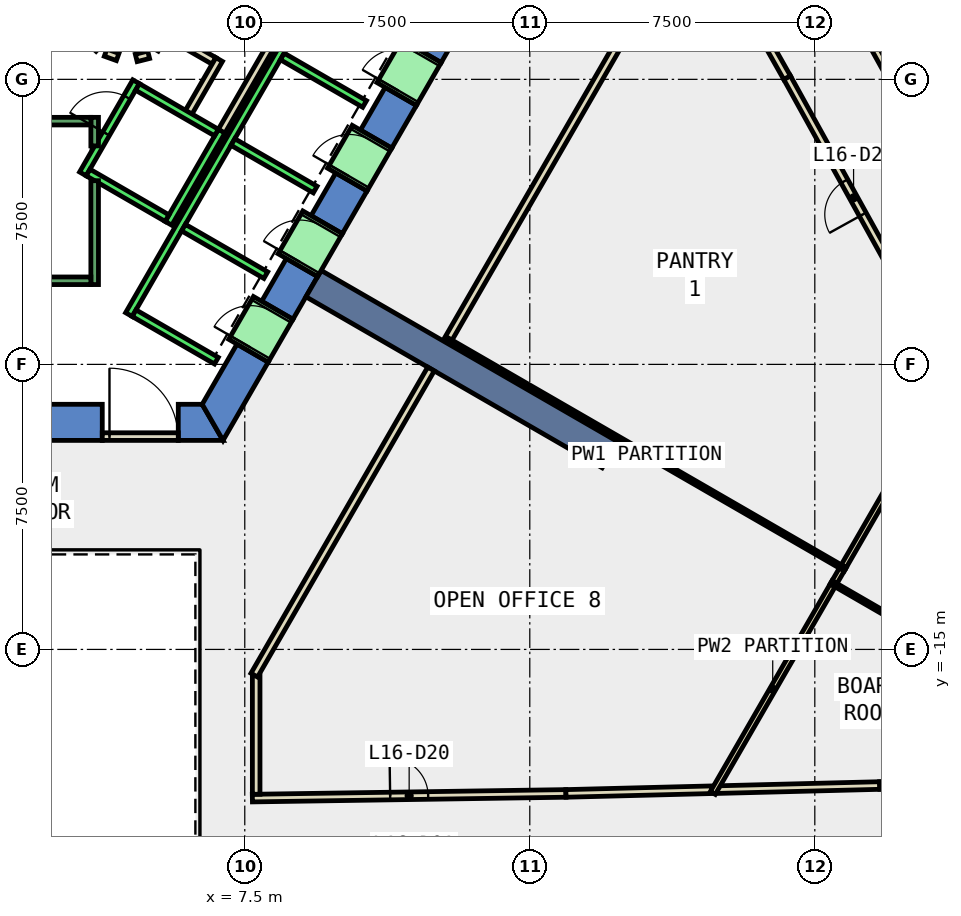
"""IFC4 building model, lengths in metres.
Left out: names, types, materials, properties, quantities, classifications, styles, units other than length and angle.
Written with IfcOpenShell. Run it as: python <this file> out.ifc"""

import sys

from ifc_helpers import new_model, si_unit, direction, frame, frame_2d, origin, place, context, subcontext, project, spatial, polyline, rectangle, outline, extrude, element, fill, save


model = new_model("IFC4")
c1 = context("Model", 3, precision=1e-05, world=origin(), true_north=direction((0.0, 1.0)))
c2 = subcontext(c1, "Body", "Model", "MODEL_VIEW")
j1 = project(units=[si_unit("LENGTHUNIT", "METRE"), si_unit("PLANEANGLEUNIT", "RADIAN")], contexts=[c1])
p1 = place(None, origin())
s1 = spatial("IfcSite", under=j1, at=p1, CompositionType="ELEMENT")
p2 = place(p1, origin())
s2 = spatial("IfcBuilding", under=s1, at=p2, CompositionType="ELEMENT")
p3 = place(p2, frame((0.0, 0.0, 77.0)))
s3 = spatial("IfcBuildingStorey", under=s2, at=p3, CompositionType="ELEMENT", Elevation=77.0)
p4 = place(p3, frame((0.0, 0.0, -0.4)))
e1 = element("IfcWall", 1, at=p4, inside=s3, PredefinedType="SHEAR", context=c2, shape_type="SweptSolid", body=[
    extrude(outline(polyline([(3.75, -9.5), (3.75, -8.55), (-6.38, -8.55), (-6.928, -9.5), (3.75, -9.5)])), origin(), (0.0, 0.0, 1.0), 4.0),
])
p5 = place(p3, frame((0.0, 0.0, -0.4)))
e2 = element("IfcWall", 2, at=p5, inside=s3, PredefinedType="SHEAR", context=c2, shape_type="SweptSolid", body=[
    extrude(outline(polyline([(5.75, -8.55), (5.75, -9.5), (6.928, -9.5), (6.38, -8.55), (5.75, -8.55)])), origin(), (0.0, 0.0, 1.0), 4.0),
])
p6 = place(p3, frame((0.0, 0.0, -0.4)))
e3 = element("IfcWall", 3, at=p6, inside=s3, PredefinedType="SHEAR", context=c2, shape_type="SweptSolid", body=[
    extrude(outline(polyline([(8.117, -7.44), (7.295, -6.965), (6.38, -8.55), (6.928, -9.5), (8.117, -7.44)])), origin(), (0.0, 0.0, 1.0), 4.0),
])
p7 = place(p3, frame((0.0, 0.0, -0.4)))
e4 = element("IfcWall", 4, at=p7, inside=s3, PredefinedType="SHEAR", context=c2, shape_type="SweptSolid", body=[
    extrude(outline(polyline([(9.417, -5.189), (8.594, -4.714), (7.945, -5.839), (8.767, -6.314), (9.417, -5.189)])), origin(), (0.0, 0.0, 1.0), 4.0),
])
p8 = place(p3, frame((0.0, 0.0, -0.4)))
e5 = element("IfcWall", 5, at=p8, inside=s3, PredefinedType="SHEAR", context=c2, shape_type="SweptSolid", body=[
    extrude(outline(polyline([(10.717, -2.937), (9.894, -2.462), (9.244, -3.588), (10.067, -4.063), (10.717, -2.937)])), origin(), (0.0, 0.0, 1.0), 4.0),
])
p9 = place(p3, frame((0.0, 0.0, -0.4)))
e6 = element("IfcWall", 6, at=p9, inside=s3, PredefinedType="SHEAR", context=c2, shape_type="SweptSolid", body=[
    extrude(outline(polyline([(12.017, -0.686), (11.194, -0.211), (10.544, -1.336), (11.367, -1.811), (12.017, -0.686)])), origin(), (0.0, 0.0, 1.0), 4.0),
])
p10 = place(p3, frame((0.0, 0.0, -0.4)))
e7 = element("IfcWall", 7, at=p10, inside=s3, PredefinedType="SHEAR", context=c2, shape_type="SweptSolid", body=[
    extrude(outline(polyline([(11.844, 0.915), (12.667, 0.44), (13.856, 2.5), (12.759, 2.5), (11.844, 0.915)])), origin(), (0.0, 0.0, 1.0), 4.0),
])
p11 = place(p3, frame((9.31, -5.375, -0.4), z_axis=(0.0, 0.0, 1.0), x_axis=(0.866017533419, -0.500013631625, 0.0)))
e8 = element("IfcWall", 8, at=p11, inside=s3, PredefinedType="SHEAR", context=c2, shape_type="SweptSolid", body=[
    extrude(rectangle(XDim=9.0, YDim=0.8, at=frame_2d((4.5, 0.0))), origin(), (0.0, 0.0, 1.0), 4.0),
])
p12 = place(p3, frame((7.7, -18.912, 0.0), z_axis=(0.0, 0.0, 1.0), x_axis=(0.999888819649, 0.014911349423, 0.0)))
e9 = element("IfcWall", 9, at=p12, inside=s3, PredefinedType="PARTITIONING", context=c2, shape_type="SweptSolid", body=[
    extrude(rectangle(XDim=8.252, YDim=0.2, at=frame_2d((4.126, 0.0))), origin(), (0.0, 0.0, 1.0), 3.6),
])
p13 = place(p12, frame((3.626, 0.0, 0.0)))
e10 = element("IfcOpeningElement", 10, at=p13, cuts=e9, PredefinedType="OPENING", context=c2, shape_type="SweptSolid", body=[
    extrude(rectangle(XDim=1.0, YDim=2.1, at=frame_2d((0.5, 1.05))), frame((0.0, 0.11, 0.0), z_axis=(0.0, -1.0, 0.0), x_axis=(1.0, 0.0, 0.0)), (0.0, 0.0, 1.0), 0.22),
])
p14 = place(p3, frame((15.951, -18.789, 0.0), z_axis=(0.0, 0.0, 1.0), x_axis=(0.999680018084, 0.025295482688, 0.0)))
e11 = element("IfcWall", 11, at=p14, inside=s3, PredefinedType="PARTITIONING", context=c2, shape_type="SweptSolid", body=[
    extrude(rectangle(XDim=3.841, YDim=0.2, at=frame_2d((1.921, 0.0))), origin(), (0.0, 0.0, 1.0), 3.6),
])
p15 = place(p3, frame((25.27, -6.281, 0.0), z_axis=(0.0, 0.0, 1.0), x_axis=(-0.484062485326, 0.875033433818, 0.0)))
e12 = element("IfcWall", 12, at=p15, inside=s3, PredefinedType="PARTITIONING", context=c2, shape_type="SweptSolid", body=[
    extrude(rectangle(XDim=7.23, YDim=0.2, at=frame_2d((3.615, 0.0))), origin(), (0.0, 0.0, 1.0), 3.6),
])
p16 = place(p15, frame((3.115, 0.0, 0.0)))
e13 = element("IfcOpeningElement", 13, at=p16, cuts=e12, PredefinedType="OPENING", context=c2, shape_type="SweptSolid", body=[
    extrude(rectangle(XDim=1.0, YDim=2.1, at=frame_2d((0.5, 1.05))), frame((0.0, 0.11, 0.0), z_axis=(0.0, -1.0, 0.0), x_axis=(1.0, 0.0, 0.0)), (0.0, 0.0, 1.0), 0.22),
])
p17 = place(p3, frame((21.77, 0.046, 0.0), z_axis=(0.0, 0.0, 1.0), x_axis=(-0.492148137455, 0.870511465059, 0.0)))
e14 = element("IfcWall", 14, at=p17, inside=s3, PredefinedType="PARTITIONING", context=c2, shape_type="SweptSolid", body=[
    extrude(rectangle(XDim=4.868, YDim=0.2, at=frame_2d((2.434, 0.0))), origin(), (0.0, 0.0, 1.0), 3.6),
])
p18 = place(p3, frame((19.941, -18.689, 0.0), z_axis=(0.0, 0.0, 1.0), x_axis=(0.999680388185, 0.025280852018, 0.0)))
e15 = element("IfcWall", 15, at=p18, inside=s3, PredefinedType="PARTITIONING", context=c2, shape_type="SweptSolid", body=[
    extrude(rectangle(XDim=4.269, YDim=0.2, at=frame_2d((2.134, 0.0))), origin(), (0.0, 0.0, 1.0), 3.6),
])
p19 = place(p3, frame((24.208, -18.581, 0.0), z_axis=(0.0, 0.0, 1.0), x_axis=(0.99936260762, 0.035698438215, 0.0)))
e16 = element("IfcWall", 16, at=p19, inside=s3, PredefinedType="PARTITIONING", context=c2, shape_type="SweptSolid", body=[
    extrude(rectangle(XDim=7.564, YDim=0.2, at=frame_2d((3.782, 0.0))), origin(), (0.0, 0.0, 1.0), 3.6),
])
p20 = place(p19, frame((3.282, 0.0, 0.0)))
e17 = element("IfcOpeningElement", 17, at=p20, cuts=e16, PredefinedType="OPENING", context=c2, shape_type="SweptSolid", body=[
    extrude(rectangle(XDim=1.0, YDim=2.1, at=frame_2d((0.5, 1.05))), frame((0.0, 0.11, 0.0), z_axis=(0.0, -1.0, 0.0), x_axis=(1.0, 0.0, 0.0)), (0.0, 0.0, 1.0), 0.22),
])
p21 = place(p3, frame((23.828, 1.283, 0.0), z_axis=(0.0, 0.0, 1.0), x_axis=(0.484064127728, -0.875032525251, 0.0)))
e18 = element("IfcWall", 18, at=p21, inside=s3, PredefinedType="PARTITIONING", context=c2, shape_type="SweptSolid", body=[
    extrude(rectangle(XDim=7.251, YDim=0.2, at=frame_2d((3.625, 0.0))), origin(), (0.0, 0.0, 1.0), 3.6),
])
p22 = place(p21, frame((3.201, 0.0, 0.0)))
e19 = element("IfcOpeningElement", 19, at=p22, cuts=e18, PredefinedType="OPENING", context=c2, shape_type="SweptSolid", body=[
    extrude(rectangle(XDim=1.0, YDim=2.1, at=frame_2d((0.5, 1.05))), frame((0.0, 0.11, 0.0), z_axis=(0.0, -1.0, 0.0), x_axis=(1.0, 0.0, 0.0)), (0.0, 0.0, 1.0), 0.22),
])
p23 = place(p3, frame((5.499, 1.172, 0.0), z_axis=(0.0, 0.0, 1.0), x_axis=(0.866333505267, -0.499465972466, 0.0)))
e20 = element("IfcWall", 20, at=p23, inside=s3, PredefinedType="PARTITIONING", context=c2, shape_type="SweptSolid", body=[
    extrude(rectangle(XDim=1.374, YDim=0.2, at=frame_2d((0.687, 0.0))), origin(), (0.0, 0.0, 1.0), 3.6),
])
p24 = place(p3, frame((6.826, 0.522, 0.0), z_axis=(0.0, 0.0, 1.0), x_axis=(-0.500016722714, -0.866015748706, 0.0)))
e21 = element("IfcWall", 21, at=p24, inside=s3, PredefinedType="PARTITIONING", context=c2, shape_type="SweptSolid", body=[
    extrude(rectangle(XDim=1.7, YDim=0.2, at=frame_2d((0.85, 0.0))), origin(), (0.0, 0.0, 1.0), 3.6),
])
p25 = place(p3, frame((8.192, 0.888, 0.0), z_axis=(0.0, 0.0, 1.0), x_axis=(-0.499940625693, -0.866059680843, 0.0)))
e22 = element("IfcWall", 22, at=p25, inside=s3, PredefinedType="PARTITIONING", context=c2, shape_type="SweptSolid", body=[
    extrude(rectangle(XDim=2.68, YDim=0.2, at=frame_2d((1.34, 0.0))), origin(), (0.0, 0.0, 1.0), 3.6),
])
p26 = place(p3, frame((3.838, 0.702, 0.0), z_axis=(0.0, 0.0, 1.0), x_axis=(0.941035081519, -0.338308993895, 0.0)))
e23 = element("IfcWall", 23, at=p26, inside=s3, PredefinedType="PARTITIONING", context=c2, shape_type="SweptSolid", body=[
    extrude(rectangle(XDim=0.337, YDim=0.2, at=frame_2d((0.168, 0.0))), origin(), (0.0, 0.0, 1.0), 3.6),
])
p27 = place(p3, frame((4.644, 0.564, 0.0), z_axis=(0.0, 0.0, 1.0), x_axis=(0.969929076366, 0.243387729394, 0.0)))
e24 = element("IfcWall", 24, at=p27, inside=s3, PredefinedType="PARTITIONING", context=c2, shape_type="SweptSolid", body=[
    extrude(rectangle(XDim=0.337, YDim=0.2, at=frame_2d((0.168, 0.0))), origin(), (0.0, 0.0, 1.0), 3.6),
])
p28 = place(p3, frame((7.8, -15.69, 0.0), z_axis=(0.0, 0.0, 1.0), x_axis=(0.0, -1.0, 0.0)))
e25 = element("IfcWall", 25, at=p28, inside=s3, PredefinedType="PARTITIONING", context=c2, shape_type="SweptSolid", body=[
    extrude(rectangle(XDim=3.121, YDim=0.2, at=frame_2d((1.561, 0.0))), origin(), (0.0, 0.0, 1.0), 3.6),
])
p29 = place(p3, frame((12.4, -7.621, 0.0), z_axis=(0.0, 0.0, 1.0), x_axis=(-0.49990497871, -0.866080257402, 0.0)))
e26 = element("IfcWall", 26, at=p29, inside=s3, PredefinedType="PARTITIONING", context=c2, shape_type="SweptSolid", body=[
    extrude(rectangle(XDim=9.302, YDim=0.2, at=frame_2d((4.651, 0.0))), origin(), (0.0, 0.0, 1.0), 3.6),
])
p30 = place(p3, frame((19.374, 4.458, 0.0), z_axis=(0.0, 0.0, 1.0), x_axis=(-0.499973880856, -0.866040483154, 0.0)))
e27 = element("IfcWall", 27, at=p30, inside=s3, PredefinedType="PARTITIONING", context=c2, shape_type="SweptSolid", body=[
    extrude(rectangle(XDim=13.113, YDim=0.2, at=frame_2d((6.556, 0.0))), origin(), (0.0, 0.0, 1.0), 3.6),
])
p31 = place(p3, frame((12.843, -6.855, 0.0), z_axis=(0.0, 0.0, 1.0), x_axis=(0.866054959007, -0.499948805358, 0.0)))
e28 = element("IfcWall", 28, at=p31, inside=s3, PredefinedType="PARTITIONING", context=c2, shape_type="SweptSolid", body=[
    extrude(rectangle(XDim=12.075, YDim=0.1, at=frame_2d((6.038, 0.0))), origin(), (0.0, 0.0, 1.0), 3.6),
])
p32 = place(p3, frame((22.969, -13.316, 0.0), z_axis=(0.0, 0.0, 1.0), x_axis=(-0.500007312183, -0.866021182053, 0.0)))
e29 = element("IfcWall", 29, at=p32, inside=s3, PredefinedType="PARTITIONING", context=c2, shape_type="SweptSolid", body=[
    extrude(rectangle(XDim=6.306, YDim=0.15, at=frame_2d((3.153, 0.0))), origin(), (0.0, 0.0, 1.0), 3.6),
])
p33 = place(p3, frame((23.211, -12.898, 0.0), z_axis=(0.0, 0.0, 1.0), x_axis=(-0.501488909663, -0.865164073159, 0.0)))
e30 = element("IfcWall", 30, at=p33, inside=s3, PredefinedType="PARTITIONING", context=c2, shape_type="SweptSolid", body=[
    extrude(rectangle(XDim=0.383, YDim=0.15, at=frame_2d((0.191, 0.0))), origin(), (0.0, 0.0, 1.0), 3.6),
])
p34 = place(p3, frame((26.172, -7.768, 0.0), z_axis=(0.0, 0.0, 1.0), x_axis=(-0.499945058274, -0.866057122081, 0.0)))
e31 = element("IfcWall", 31, at=p34, inside=s3, PredefinedType="PARTITIONING", context=c2, shape_type="SweptSolid", body=[
    extrude(rectangle(XDim=5.823, YDim=0.15, at=frame_2d((2.912, 0.0))), origin(), (0.0, 0.0, 1.0), 3.6),
])
p35 = place(p3, frame((22.929, -13.235, 0.0), z_axis=(0.0, 0.0, 1.0), x_axis=(0.866003823807, -0.500037375755, 0.0)))
e32 = element("IfcWall", 32, at=p35, inside=s3, PredefinedType="PARTITIONING", context=c2, shape_type="SweptSolid", body=[
    extrude(rectangle(XDim=10.245, YDim=0.1, at=frame_2d((5.123, 0.0))), origin(), (0.0, 0.0, 1.0), 3.6),
])
p36 = place(p3, frame((3.75, -9.4, 0.0), z_axis=(0.0, 0.0, 1.0), x_axis=(1.0, 0.0, 0.0)))
e33 = element("IfcWall", 33, at=p36, inside=s3, PredefinedType="PARTITIONING", context=c2, shape_type="SweptSolid", body=[
    extrude(rectangle(XDim=2.0, YDim=0.2, at=frame_2d((1.0, 0.0))), origin(), (0.0, 0.0, 1.0), 2.4),
])
p37 = place(p36, frame((0.19, 0.0, 0.0)))
e34 = element("IfcOpeningElement", 34, at=p37, cuts=e33, PredefinedType="OPENING", context=c2, shape_type="SweptSolid", body=[
    extrude(rectangle(XDim=1.8, YDim=2.1, at=frame_2d((0.9, 1.05))), frame((0.0, 0.11, 0.0), z_axis=(0.0, -1.0, 0.0), x_axis=(1.0, 0.0, 0.0)), (0.0, 0.0, 1.0), 0.22),
])
p38 = place(p3, frame((3.24, -2.488, 0.0), z_axis=(0.0, 0.0, 1.0), x_axis=(0.49994636267, 0.866056369097, 0.0)))
e35 = element("IfcWall", 35, at=p38, inside=s3, PredefinedType="STANDARD", context=c2, shape_type="SweptSolid", body=[
    extrude(rectangle(XDim=2.8, YDim=0.2, at=frame_2d((1.4, 0.0))), origin(), (0.0, 0.0, 1.0), 3.6),
])
p39 = place(p38, frame((1.225, 0.0, 0.0)))
e36 = element("IfcOpeningElement", 36, at=p39, cuts=e35, PredefinedType="OPENING", context=c2, shape_type="SweptSolid", body=[
    extrude(rectangle(XDim=1.1, YDim=2.1, at=frame_2d((0.55, 1.05))), frame((0.0, 0.11, 0.0), z_axis=(0.0, -1.0, 0.0), x_axis=(1.0, 0.0, 0.0)), (0.0, 0.0, 1.0), 0.22),
])
p40 = place(p3, frame((5.492, -3.788, 0.0), z_axis=(0.0, 0.0, 1.0), x_axis=(0.500011755427, 0.866018616679, 0.0)))
e37 = element("IfcWall", 37, at=p40, inside=s3, PredefinedType="STANDARD", context=c2, shape_type="SweptSolid", body=[
    extrude(rectangle(XDim=2.8, YDim=0.2, at=frame_2d((1.4, 0.0))), origin(), (0.0, 0.0, 1.0), 3.6),
])
p41 = place(p3, frame((3.377, -2.452, 0.0), z_axis=(0.0, 0.0, 1.0), x_axis=(0.865955154139, -0.50012165622, 0.0)))
e38 = element("IfcWall", 38, at=p41, inside=s3, PredefinedType="STANDARD", context=c2, shape_type="SweptSolid", body=[
    extrude(rectangle(XDim=2.4, YDim=0.2, at=frame_2d((1.2, 0.0))), origin(), (0.0, 0.0, 1.0), 3.6),
])
p42 = place(p3, frame((4.677, -0.2, 0.0), z_axis=(0.0, 0.0, 1.0), x_axis=(0.865973769406, -0.500089422704, 0.0)))
e39 = element("IfcWall", 39, at=p42, inside=s3, PredefinedType="STANDARD", context=c2, shape_type="SweptSolid", body=[
    extrude(rectangle(XDim=2.399, YDim=0.2, at=frame_2d((1.2, 0.0))), origin(), (0.0, 0.0, 1.0), 3.6),
])
p43 = place(p3, frame((4.451, -6.19, 0.0), z_axis=(0.0, 0.0, 1.0), x_axis=(0.50000090737, 0.866024879913, 0.0)))
e40 = element("IfcWall", 40, at=p43, inside=s3, PredefinedType="STANDARD", context=c2, shape_type="SweptSolid", body=[
    extrude(rectangle(XDim=10.6, YDim=0.2, at=frame_2d((5.3, 0.0))), origin(), (0.0, 0.0, 1.0), 3.6),
])
for number, where, z_axis, x_axis in (
    (41, (4.588, -6.153, 0.0), (0.0, 0.0, 1.0), (0.866, -0.5, 0.0)),
    (42, (5.888, -3.902, 0.0), (0.0, 0.0, 1.0), (0.866, -0.5, 0.0)),
    (43, (7.188, -1.65, 0.0), (0.0, 0.0, 1.0), (0.866, -0.5, 0.0)),
    (44, (8.488, 0.602, 0.0), (0.0, 0.0, 1.0), (0.866, -0.5, 0.0)),
):
    element("IfcWall", number, at=place(p3, frame(where, z_axis=z_axis, x_axis=x_axis)), inside=s3, PredefinedType="STANDARD", context=c2, shape_type="SweptSolid", body=[
        extrude(rectangle(XDim=2.5, YDim=0.2, at=frame_2d((1.25, 0.0))), origin(), (0.0, 0.0, 1.0), 3.6),
    ])
p44 = place(p3, frame((7.598, -7.14, 0.0), z_axis=(0.0, 0.0, 1.0), x_axis=(0.500362116554, 0.865816234728, 0.0)))
e45 = element("IfcWall", 45, at=p44, inside=s3, PredefinedType="STANDARD", context=c2, shape_type="SweptSolid", body=[
    extrude(rectangle(XDim=1.299, YDim=1.2, at=frame_2d((0.65, 0.0))), origin(), (0.0, 0.0, 1.0), 2.4),
])
p45 = place(p44, frame((0.1, 0.0, 0.0)))
e46 = element("IfcOpeningElement", 46, at=p45, cuts=e45, PredefinedType="OPENING", context=c2, shape_type="SweptSolid", body=[
    extrude(rectangle(XDim=1.1, YDim=2.3, at=frame_2d((0.55, 1.15))), frame((0.0, 0.61, 0.0), z_axis=(0.0, -1.0, 0.0), x_axis=(1.0, 0.0, 0.0)), (0.0, 0.0, 1.0), 1.22),
])
p46 = place(p3, frame((8.898, -4.889, 0.0), z_axis=(0.0, 0.0, 1.0), x_axis=(0.500036693733, 0.866004217611, 0.0)))
e47 = element("IfcWall", 47, at=p46, inside=s3, PredefinedType="STANDARD", context=c2, shape_type="SweptSolid", body=[
    extrude(rectangle(XDim=1.3, YDim=1.2, at=frame_2d((0.65, 0.0))), origin(), (0.0, 0.0, 1.0), 2.4),
])
p47 = place(p46, frame((0.1, 0.0, 0.0)))
e48 = element("IfcOpeningElement", 48, at=p47, cuts=e47, PredefinedType="OPENING", context=c2, shape_type="SweptSolid", body=[
    extrude(rectangle(XDim=1.1, YDim=2.3, at=frame_2d((0.55, 1.15))), frame((0.0, 0.61, 0.0), z_axis=(0.0, -1.0, 0.0), x_axis=(1.0, 0.0, 0.0)), (0.0, 0.0, 1.0), 1.22),
])
p48 = place(p3, frame((10.198, -2.637, 0.0), z_axis=(0.0, 0.0, 1.0), x_axis=(0.49989585183, 0.866085525409, 0.0)))
e49 = element("IfcWall", 49, at=p48, inside=s3, PredefinedType="STANDARD", context=c2, shape_type="SweptSolid", body=[
    extrude(rectangle(XDim=1.3, YDim=1.2, at=frame_2d((0.65, 0.0))), origin(), (0.0, 0.0, 1.0), 2.4),
])
p49 = place(p48, frame((0.1, 0.0, 0.0)))
e50 = element("IfcOpeningElement", 50, at=p49, cuts=e49, PredefinedType="OPENING", context=c2, shape_type="SweptSolid", body=[
    extrude(rectangle(XDim=1.1, YDim=2.3, at=frame_2d((0.55, 1.15))), frame((0.0, 0.61, 0.0), z_axis=(0.0, -1.0, 0.0), x_axis=(1.0, 0.0, 0.0)), (0.0, 0.0, 1.0), 1.22),
])
p50 = place(p3, frame((11.498, -0.385, 0.0), z_axis=(0.0, 0.0, 1.0), x_axis=(0.500221244143, 0.865897630733, 0.0)))
e51 = element("IfcWall", 51, at=p50, inside=s3, PredefinedType="STANDARD", context=c2, shape_type="SweptSolid", body=[
    extrude(rectangle(XDim=1.299, YDim=1.2, at=frame_2d((0.65, 0.0))), origin(), (0.0, 0.0, 1.0), 2.4),
])
p51 = place(p50, frame((0.1, 0.0, 0.0)))
e52 = element("IfcOpeningElement", 52, at=p51, cuts=e51, PredefinedType="OPENING", context=c2, shape_type="SweptSolid", body=[
    extrude(rectangle(XDim=1.1, YDim=2.3, at=frame_2d((0.55, 1.15))), frame((0.0, 0.61, 0.0), z_axis=(0.0, -1.0, 0.0), x_axis=(1.0, 0.0, 0.0)), (0.0, 0.0, 1.0), 1.22),
])
p52 = place(p3, frame((3.55, -2.667, 0.0), z_axis=(0.0, 0.0, 1.0), x_axis=(0.0, -1.0, 0.0)))
e53 = element("IfcWall", 53, at=p52, inside=s3, PredefinedType="STANDARD", context=c2, shape_type="SweptSolid", body=[
    extrude(rectangle(XDim=2.733, YDim=0.2, at=frame_2d((1.366, 0.0))), origin(), (0.0, 0.0, 1.0), 3.6),
])
p53 = place(p3, frame((3.55, -1.0, 0.0), z_axis=(0.0, 0.0, 1.0), x_axis=(0.0, -1.0, 0.0)))
e54 = element("IfcWall", 54, at=p53, inside=s3, PredefinedType="STANDARD", context=c2, shape_type="SweptSolid", body=[
    extrude(rectangle(XDim=0.751, YDim=0.2, at=frame_2d((0.375, 0.0))), origin(), (0.0, 0.0, 1.0), 3.6),
])
p54 = place(p3, frame((-3.45, -1.1, 0.0), z_axis=(0.0, 0.0, 1.0), x_axis=(1.0, 0.0, 0.0)))
e55 = element("IfcWall", 55, at=p54, inside=s3, PredefinedType="STANDARD", context=c2, shape_type="SweptSolid", body=[
    extrude(rectangle(XDim=6.9, YDim=0.2, at=frame_2d((3.45, 0.0))), origin(), (0.0, 0.0, 1.0), 3.6),
])
p55 = place(p54, frame((0.45, 0.0, 0.0)))
e56 = element("IfcOpeningElement", 56, at=p55, cuts=e55, PredefinedType="OPENING", context=c2, shape_type="SweptSolid", body=[
    extrude(rectangle(XDim=1.1, YDim=2.2, at=frame_2d((0.55, 1.1))), frame((0.0, 0.11, 0.0), z_axis=(0.0, -1.0, 0.0), x_axis=(1.0, 0.0, 0.0)), (0.0, 0.0, 1.0), 0.22),
])
p56 = place(p3, frame((-3.45, -5.3, 0.0), z_axis=(0.0, 0.0, 1.0), x_axis=(1.0, 0.0, 0.0)))
e57 = element("IfcWall", 57, at=p56, inside=s3, PredefinedType="STANDARD", context=c2, shape_type="SweptSolid", body=[
    extrude(rectangle(XDim=6.9, YDim=0.2, at=frame_2d((3.45, 0.0))), origin(), (0.0, 0.0, 1.0), 3.6),
])
p57 = place(p13, origin())
e58 = element("IfcDoor", 58, at=p57, inside=s3, OperationType="SINGLE_SWING_RIGHT", PredefinedType="DOOR", context=c2, shape_type="SweptSolid", body=[
    extrude(rectangle(XDim=1.0, YDim=2.1, at=frame_2d((0.5, 1.05))), frame((0.0, 0.025, 0.0), z_axis=(0.0, -1.0, 0.0), x_axis=(1.0, 0.0, 0.0)), (0.0, 0.0, 1.0), 0.05),
])
fill(e10, e58)
p58 = place(p16, origin())
e59 = element("IfcDoor", 59, at=p58, inside=s3, OperationType="SINGLE_SWING_RIGHT", PredefinedType="DOOR", context=c2, shape_type="SweptSolid", body=[
    extrude(rectangle(XDim=1.0, YDim=2.1, at=frame_2d((0.5, 1.05))), frame((0.0, 0.025, 0.0), z_axis=(0.0, -1.0, 0.0), x_axis=(1.0, 0.0, 0.0)), (0.0, 0.0, 1.0), 0.05),
])
fill(e13, e59)
p59 = place(p37, origin())
e60 = element("IfcDoor", 60, at=p59, inside=s3, OperationType="DOUBLE_DOOR_SINGLE_SWING", PredefinedType="DOOR", context=c2, shape_type="SweptSolid", body=[
    extrude(rectangle(XDim=1.8, YDim=2.1, at=frame_2d((0.9, 1.05))), frame((0.0, 0.025, 0.0), z_axis=(0.0, -1.0, 0.0), x_axis=(1.0, 0.0, 0.0)), (0.0, 0.0, 1.0), 0.05),
])
fill(e34, e60)
p60 = place(p45, origin())
e61 = element("IfcDoor", 61, at=p60, inside=s3, OperationType="SLIDING_TO_LEFT", PredefinedType="DOOR", context=c2, shape_type="SweptSolid", body=[
    extrude(rectangle(XDim=1.1, YDim=2.3, at=frame_2d((0.55, 1.15))), frame((0.0, 0.025, 0.0), z_axis=(0.0, -1.0, 0.0), x_axis=(1.0, 0.0, 0.0)), (0.0, 0.0, 1.0), 0.05),
])
fill(e46, e61)
p61 = place(p47, origin())
e62 = element("IfcDoor", 62, at=p61, inside=s3, OperationType="SLIDING_TO_LEFT", PredefinedType="DOOR", context=c2, shape_type="SweptSolid", body=[
    extrude(rectangle(XDim=1.1, YDim=2.3, at=frame_2d((0.55, 1.15))), frame((0.0, 0.025, 0.0), z_axis=(0.0, -1.0, 0.0), x_axis=(1.0, 0.0, 0.0)), (0.0, 0.0, 1.0), 0.05),
])
fill(e48, e62)
p62 = place(p49, origin())
e63 = element("IfcDoor", 63, at=p62, inside=s3, OperationType="SLIDING_TO_LEFT", PredefinedType="DOOR", context=c2, shape_type="SweptSolid", body=[
    extrude(rectangle(XDim=1.1, YDim=2.3, at=frame_2d((0.55, 1.15))), frame((0.0, 0.025, 0.0), z_axis=(0.0, -1.0, 0.0), x_axis=(1.0, 0.0, 0.0)), (0.0, 0.0, 1.0), 0.05),
])
fill(e50, e63)
p63 = place(p51, origin())
e64 = element("IfcDoor", 64, at=p63, inside=s3, OperationType="SLIDING_TO_LEFT", PredefinedType="DOOR", context=c2, shape_type="SweptSolid", body=[
    extrude(rectangle(XDim=1.1, YDim=2.3, at=frame_2d((0.55, 1.15))), frame((0.0, 0.025, 0.0), z_axis=(0.0, -1.0, 0.0), x_axis=(1.0, 0.0, 0.0)), (0.0, 0.0, 1.0), 0.05),
])
fill(e52, e64)
p64 = place(p39, origin())
e65 = element("IfcDoor", 65, at=p64, inside=s3, OperationType="SLIDING_TO_LEFT", PredefinedType="DOOR", context=c2, shape_type="SweptSolid", body=[
    extrude(rectangle(XDim=1.1, YDim=2.1, at=frame_2d((0.55, 1.05))), frame((0.0, 0.025, 0.0), z_axis=(0.0, -1.0, 0.0), x_axis=(1.0, 0.0, 0.0)), (0.0, 0.0, 1.0), 0.05),
])
fill(e36, e65)
save(model, sys.argv[1])
